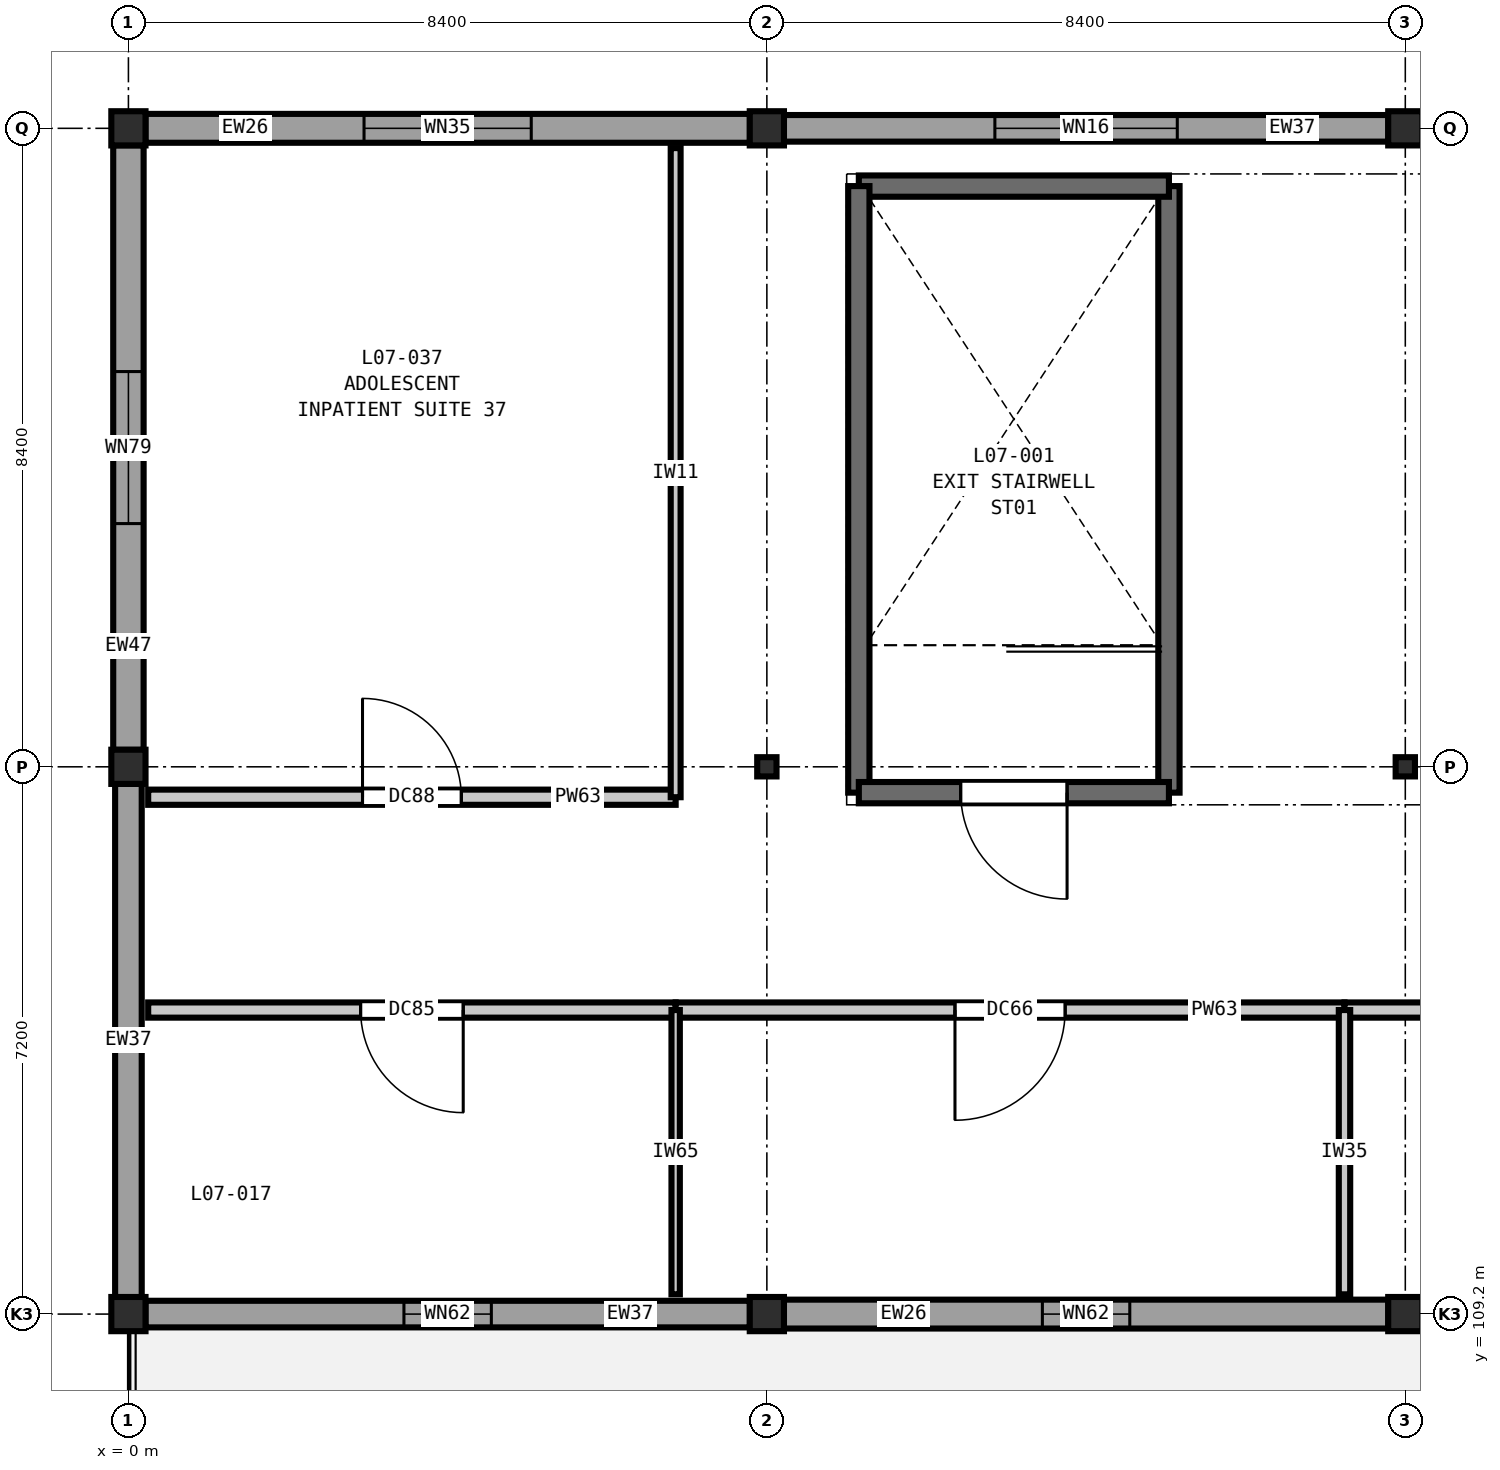
"""IFC4 building model, lengths in metres.
Left out: names, types, materials, properties, quantities, classifications, styles, units other than length and angle.
Written with IfcOpenShell. Run it as: python <this file> out.ifc"""

import sys

from ifc_helpers import new_model, si_unit, direction, frame, frame_2d, origin, origin_2d, place, context, subcontext, project, spatial, rectangle, i_section, extrude, element, fill, save


model = new_model("IFC4")
c1 = context("Model", 3, precision=1e-05, world=origin(), true_north=direction((0.0, 1.0)))
c2 = subcontext(c1, "Body", "Model", "MODEL_VIEW")
j1 = project(units=[si_unit("LENGTHUNIT", "METRE"), si_unit("PLANEANGLEUNIT", "RADIAN")], contexts=[c1])
p1 = place(None, origin())
s1 = spatial("IfcSite", under=j1, at=p1, CompositionType="ELEMENT")
p2 = place(p1, origin())
s2 = spatial("IfcBuilding", under=s1, at=p2, CompositionType="ELEMENT")
p3 = place(p2, frame((0.0, 0.0, 33.0)))
s3 = spatial("IfcBuildingStorey", under=s2, at=p3, CompositionType="ELEMENT", Elevation=33.0)
for number, where, z_axis, x_axis in (
    (1, (0.0, 109.2, 0.0), (0.0, 0.0, 1.0), (1.0, 0.0, 0.0)),
    (2, (0.0, 116.4, 0.0), (0.0, 0.0, 1.0), (1.0, 0.0, 0.0)),
    (3, (0.0, 124.8, 0.0), (0.0, 0.0, 1.0), (1.0, 0.0, 0.0)),
    (4, (8.4, 109.2, 0.0), (0.0, 0.0, 1.0), (1.0, 0.0, 0.0)),
):
    element("IfcColumn", number, at=place(p3, frame(where, z_axis=z_axis, x_axis=x_axis)), inside=s3, PredefinedType="COLUMN", context=c2, shape_type="SweptSolid", body=[
        extrude(rectangle(XDim=0.45, YDim=0.45, at=origin_2d()), origin(), (0.0, 0.0, 1.0), 4.2),
    ])
p4 = place(p3, frame((8.4, 116.4, 0.0), z_axis=(0.0, 0.0, 1.0), x_axis=(1.0, 0.0, 0.0)))
e5 = element("IfcColumn", 5, at=p4, inside=s3, PredefinedType="COLUMN", context=c2, shape_type="SweptSolid", body=[
    extrude(i_section(OverallWidth=0.254, OverallDepth=0.253, WebThickness=0.009, FlangeThickness=0.014, FilletRadius=0.013, at=origin_2d()), origin(), (0.0, 0.0, 1.0), 4.2),
])
for number, where, z_axis, x_axis in (
    (6, (8.4, 124.8, 0.0), (0.0, 0.0, 1.0), (1.0, 0.0, 0.0)),
    (7, (16.8, 109.2, 0.0), (0.0, 0.0, 1.0), (1.0, 0.0, 0.0)),
):
    element("IfcColumn", number, at=place(p3, frame(where, z_axis=z_axis, x_axis=x_axis)), inside=s3, PredefinedType="COLUMN", context=c2, shape_type="SweptSolid", body=[
        extrude(rectangle(XDim=0.45, YDim=0.45, at=origin_2d()), origin(), (0.0, 0.0, 1.0), 4.2),
    ])
p5 = place(p3, frame((16.8, 116.4, 0.0), z_axis=(0.0, 0.0, 1.0), x_axis=(1.0, 0.0, 0.0)))
e8 = element("IfcColumn", 8, at=p5, inside=s3, PredefinedType="COLUMN", context=c2, shape_type="SweptSolid", body=[
    extrude(i_section(OverallWidth=0.254, OverallDepth=0.253, WebThickness=0.009, FlangeThickness=0.014, FilletRadius=0.013, at=origin_2d()), origin(), (0.0, 0.0, 1.0), 4.2),
])
p6 = place(p3, frame((16.8, 124.8, 0.0), z_axis=(0.0, 0.0, 1.0), x_axis=(1.0, 0.0, 0.0)))
e9 = element("IfcColumn", 9, at=p6, inside=s3, PredefinedType="COLUMN", context=c2, shape_type="SweptSolid", body=[
    extrude(rectangle(XDim=0.45, YDim=0.45, at=origin_2d()), origin(), (0.0, 0.0, 1.0), 4.2),
])
p7 = place(p3, frame((0.0, 109.423, 0.0), z_axis=(0.0, 0.0, 1.0), x_axis=(0.0, 1.0, 0.0)))
e10 = element("IfcWall", 10, at=p7, inside=s3, PredefinedType="SOLIDWALL", context=c2, shape_type="SweptSolid", body=[
    extrude(rectangle(XDim=6.754, YDim=0.35, at=frame_2d((3.377, 0.0))), origin(), (0.0, 0.0, 1.0), 3.48),
])
p8 = place(p3, frame((0.0, 116.623, 0.0), z_axis=(0.0, 0.0, 1.0), x_axis=(0.0, 1.0, 0.0)))
e11 = element("IfcWall", 11, at=p8, inside=s3, PredefinedType="SOLIDWALL", context=c2, shape_type="SweptSolid", body=[
    extrude(rectangle(XDim=7.954, YDim=0.4, at=frame_2d((3.977, 0.0))), origin(), (0.0, 0.0, 1.0), 3.48),
])
p9 = place(p8, frame((2.977, 0.0, 0.9)))
e12 = element("IfcOpeningElement", 12, at=p9, cuts=e11, PredefinedType="OPENING", context=c2, shape_type="SweptSolid", body=[
    extrude(rectangle(XDim=2.0, YDim=1.95, at=frame_2d((1.0, 0.975))), frame((0.0, 0.21, 0.0), z_axis=(0.0, -1.0, 0.0), x_axis=(1.0, 0.0, 0.0)), (0.0, 0.0, 1.0), 0.42),
])
p10 = place(p3, frame((0.223, 124.8, 0.0), z_axis=(0.0, 0.0, 1.0), x_axis=(1.0, 0.0, 0.0)))
e13 = element("IfcWall", 13, at=p10, inside=s3, PredefinedType="SOLIDWALL", context=c2, shape_type="SweptSolid", body=[
    extrude(rectangle(XDim=7.954, YDim=0.38, at=frame_2d((3.977, 0.0))), origin(), (0.0, 0.0, 1.0), 3.48),
])
p11 = place(p10, frame((2.877, 0.0, 0.9)))
e14 = element("IfcOpeningElement", 14, at=p11, cuts=e13, PredefinedType="OPENING", context=c2, shape_type="SweptSolid", body=[
    extrude(rectangle(XDim=2.2, YDim=1.95, at=frame_2d((1.1, 0.975))), frame((0.0, 0.2, 0.0), z_axis=(0.0, -1.0, 0.0), x_axis=(1.0, 0.0, 0.0)), (0.0, 0.0, 1.0), 0.4),
])
p12 = place(p3, frame((8.623, 124.8, 0.0), z_axis=(0.0, 0.0, 1.0), x_axis=(1.0, 0.0, 0.0)))
e15 = element("IfcWall", 15, at=p12, inside=s3, PredefinedType="SOLIDWALL", context=c2, shape_type="SweptSolid", body=[
    extrude(rectangle(XDim=7.954, YDim=0.35, at=frame_2d((3.977, 0.0))), origin(), (0.0, 0.0, 1.0), 3.48),
])
p13 = place(p12, frame((2.777, 0.0, 0.9)))
e16 = element("IfcOpeningElement", 16, at=p13, cuts=e15, PredefinedType="OPENING", context=c2, shape_type="SweptSolid", body=[
    extrude(rectangle(XDim=2.4, YDim=1.95, at=frame_2d((1.2, 0.975))), frame((0.0, 0.185, 0.0), z_axis=(0.0, -1.0, 0.0), x_axis=(1.0, 0.0, 0.0)), (0.0, 0.0, 1.0), 0.37),
])
p14 = place(p3, frame((16.577, 109.2, 0.0), z_axis=(0.0, 0.0, 1.0), x_axis=(-1.0, 0.0, 0.0)))
e17 = element("IfcWall", 17, at=p14, inside=s3, PredefinedType="SOLIDWALL", context=c2, shape_type="SweptSolid", body=[
    extrude(rectangle(XDim=7.954, YDim=0.38, at=frame_2d((3.977, 0.0))), origin(), (0.0, 0.0, 1.0), 3.48),
])
p15 = place(p14, frame((3.402, 0.0, 0.9)))
e18 = element("IfcOpeningElement", 18, at=p15, cuts=e17, PredefinedType="OPENING", context=c2, shape_type="SweptSolid", body=[
    extrude(rectangle(XDim=1.15, YDim=1.4, at=frame_2d((0.575, 0.7))), frame((0.0, 0.2, 0.0), z_axis=(0.0, -1.0, 0.0), x_axis=(1.0, 0.0, 0.0)), (0.0, 0.0, 1.0), 0.4),
])
p16 = place(p3, frame((8.177, 109.2, 0.0), z_axis=(0.0, 0.0, 1.0), x_axis=(-1.0, 0.0, 0.0)))
e19 = element("IfcWall", 19, at=p16, inside=s3, PredefinedType="SOLIDWALL", context=c2, shape_type="SweptSolid", body=[
    extrude(rectangle(XDim=7.954, YDim=0.35, at=frame_2d((3.977, 0.0))), origin(), (0.0, 0.0, 1.0), 3.48),
])
p17 = place(p16, frame((3.402, 0.0, 0.9)))
e20 = element("IfcOpeningElement", 20, at=p17, cuts=e19, PredefinedType="OPENING", context=c2, shape_type="SweptSolid", body=[
    extrude(rectangle(XDim=1.15, YDim=1.4, at=frame_2d((0.575, 0.7))), frame((0.0, 0.185, 0.0), z_axis=(0.0, -1.0, 0.0), x_axis=(1.0, 0.0, 0.0)), (0.0, 0.0, 1.0), 0.37),
])
p18 = place(p3, frame((13.69, 116.06, 0.0), z_axis=(0.0, 0.0, 1.0), x_axis=(0.0, 1.0, 0.0)))
e21 = element("IfcWall", 21, at=p18, inside=s3, PredefinedType="SHEAR", context=c2, shape_type="SweptSolid", body=[
    extrude(rectangle(XDim=7.98, YDim=0.28, at=frame_2d((3.99, 0.0))), origin(), (0.0, 0.0, 1.0), 4.2),
])
p19 = place(p3, frame((13.69, 124.04, 0.0), z_axis=(0.0, 0.0, 1.0), x_axis=(-1.0, 0.0, 0.0)))
e22 = element("IfcWall", 22, at=p19, inside=s3, PredefinedType="SHEAR", context=c2, shape_type="SweptSolid", body=[
    extrude(rectangle(XDim=4.08, YDim=0.28, at=frame_2d((2.04, 0.0))), origin(), (0.0, 0.0, 1.0), 4.2),
])
p20 = place(p3, frame((9.61, 124.04, 0.0), z_axis=(0.0, 0.0, 1.0), x_axis=(0.0, -1.0, 0.0)))
e23 = element("IfcWall", 23, at=p20, inside=s3, PredefinedType="SHEAR", context=c2, shape_type="SweptSolid", body=[
    extrude(rectangle(XDim=7.98, YDim=0.28, at=frame_2d((3.99, 0.0))), origin(), (0.0, 0.0, 1.0), 4.2),
])
p21 = place(p3, frame((9.61, 116.06, 0.0), z_axis=(0.0, 0.0, 1.0), x_axis=(1.0, 0.0, 0.0)))
e24 = element("IfcWall", 24, at=p21, inside=s3, PredefinedType="SHEAR", context=c2, shape_type="SweptSolid", body=[
    extrude(rectangle(XDim=4.08, YDim=0.28, at=frame_2d((2.04, 0.0))), origin(), (0.0, 0.0, 1.0), 4.2),
])
p22 = place(p21, frame((1.34, 0.0, 0.0)))
e25 = element("IfcOpeningElement", 25, at=p22, cuts=e24, PredefinedType="OPENING", context=c2, shape_type="SweptSolid", body=[
    extrude(rectangle(XDim=1.4, YDim=2.2, at=frame_2d((0.7, 1.1))), frame((0.0, 0.15, 0.0), z_axis=(0.0, -1.0, 0.0), x_axis=(1.0, 0.0, 0.0)), (0.0, 0.0, 1.0), 0.3),
])
p23 = place(p3, frame((0.26, 113.2, 0.0), z_axis=(0.0, 0.0, 1.0), x_axis=(1.0, 0.0, 0.0)))
e26 = element("IfcWall", 26, at=p23, inside=s3, PredefinedType="PARTITIONING", context=c2, shape_type="SweptSolid", body=[
    extrude(rectangle(XDim=6.94, YDim=0.2, at=frame_2d((3.47, 0.0))), origin(), (0.0, 0.0, 1.0), 3.92),
])
p24 = place(p23, frame((2.795, 0.0, 0.0)))
e27 = element("IfcOpeningElement", 27, at=p24, cuts=e26, PredefinedType="OPENING", context=c2, shape_type="SweptSolid", body=[
    extrude(rectangle(XDim=1.35, YDim=2.2, at=frame_2d((0.675, 1.1))), frame((0.0, 0.11, 0.0), z_axis=(0.0, -1.0, 0.0), x_axis=(1.0, 0.0, 0.0)), (0.0, 0.0, 1.0), 0.22),
])
p25 = place(p3, frame((7.2, 113.2, 0.0), z_axis=(0.0, 0.0, 1.0), x_axis=(1.0, 0.0, 0.0)))
e28 = element("IfcWall", 28, at=p25, inside=s3, PredefinedType="PARTITIONING", context=c2, shape_type="SweptSolid", body=[
    extrude(rectangle(XDim=8.8, YDim=0.2, at=frame_2d((4.4, 0.0))), origin(), (0.0, 0.0, 1.0), 3.92),
])
p26 = place(p25, frame((3.675, 0.0, 0.0)))
e29 = element("IfcOpeningElement", 29, at=p26, cuts=e28, PredefinedType="OPENING", context=c2, shape_type="SweptSolid", body=[
    extrude(rectangle(XDim=1.45, YDim=2.25, at=frame_2d((0.725, 1.125))), frame((0.0, 0.11, 0.0), z_axis=(0.0, -1.0, 0.0), x_axis=(1.0, 0.0, 0.0)), (0.0, 0.0, 1.0), 0.22),
])
p27 = place(p3, frame((16.0, 113.2, 0.0), z_axis=(0.0, 0.0, 1.0), x_axis=(1.0, 0.0, 0.0)))
e30 = element("IfcWall", 30, at=p27, inside=s3, PredefinedType="PARTITIONING", context=c2, shape_type="SweptSolid", body=[
    extrude(rectangle(XDim=5.6, YDim=0.2, at=frame_2d((2.8, 0.0))), origin(), (0.0, 0.0, 1.0), 3.92),
])
p28 = place(p27, frame((2.025, 0.0, 0.0)))
e31 = element("IfcOpeningElement", 31, at=p28, cuts=e30, PredefinedType="OPENING", context=c2, shape_type="SweptSolid", body=[
    extrude(rectangle(XDim=1.55, YDim=2.25, at=frame_2d((0.775, 1.125))), frame((0.0, 0.11, 0.0), z_axis=(0.0, -1.0, 0.0), x_axis=(1.0, 0.0, 0.0)), (0.0, 0.0, 1.0), 0.22),
])
p29 = place(p3, frame((0.26, 116.0, 0.0), z_axis=(0.0, 0.0, 1.0), x_axis=(1.0, 0.0, 0.0)))
e32 = element("IfcWall", 32, at=p29, inside=s3, PredefinedType="PARTITIONING", context=c2, shape_type="SweptSolid", body=[
    extrude(rectangle(XDim=6.94, YDim=0.2, at=frame_2d((3.47, 0.0))), origin(), (0.0, 0.0, 1.0), 3.92),
])
p30 = place(p29, frame((2.82, 0.0, 0.0)))
e33 = element("IfcOpeningElement", 33, at=p30, cuts=e32, PredefinedType="OPENING", context=c2, shape_type="SweptSolid", body=[
    extrude(rectangle(XDim=1.3, YDim=2.2, at=frame_2d((0.65, 1.1))), frame((0.0, 0.11, 0.0), z_axis=(0.0, -1.0, 0.0), x_axis=(1.0, 0.0, 0.0)), (0.0, 0.0, 1.0), 0.22),
])
p31 = place(p3, frame((7.2, 109.46, 0.0), z_axis=(0.0, 0.0, 1.0), x_axis=(0.0, 1.0, 0.0)))
e34 = element("IfcWall", 34, at=p31, inside=s3, PredefinedType="PARTITIONING", context=c2, shape_type="SweptSolid", body=[
    extrude(rectangle(XDim=3.74, YDim=0.11, at=frame_2d((1.87, 0.0))), origin(), (0.0, 0.0, 1.0), 3.92),
])
p32 = place(p3, frame((7.2, 116.0, 0.0), z_axis=(0.0, 0.0, 1.0), x_axis=(0.0, 1.0, 0.0)))
e35 = element("IfcWall", 35, at=p32, inside=s3, PredefinedType="PARTITIONING", context=c2, shape_type="SweptSolid", body=[
    extrude(rectangle(XDim=8.54, YDim=0.13, at=frame_2d((4.27, 0.0))), origin(), (0.0, 0.0, 1.0), 3.92),
])
p33 = place(p3, frame((16.0, 109.46, 0.0), z_axis=(0.0, 0.0, 1.0), x_axis=(0.0, 1.0, 0.0)))
e36 = element("IfcWall", 36, at=p33, inside=s3, PredefinedType="PARTITIONING", context=c2, shape_type="SweptSolid", body=[
    extrude(rectangle(XDim=3.74, YDim=0.15, at=frame_2d((1.87, 0.0))), origin(), (0.0, 0.0, 1.0), 3.92),
])
p34 = place(p9, origin())
e37 = element("IfcWindow", 37, at=p34, inside=s3, PartitioningType="DOUBLE_PANEL_VERTICAL", PredefinedType="WINDOW", context=c2, shape_type="SweptSolid", body=[
    extrude(rectangle(XDim=2.0, YDim=1.95, at=frame_2d((1.0, 0.975))), frame((0.0, 0.03, 0.0), z_axis=(0.0, -1.0, 0.0), x_axis=(1.0, 0.0, 0.0)), (0.0, 0.0, 1.0), 0.06),
])
fill(e12, e37)
p35 = place(p11, origin())
e38 = element("IfcWindow", 38, at=p35, inside=s3, PartitioningType="DOUBLE_PANEL_VERTICAL", PredefinedType="WINDOW", context=c2, shape_type="SweptSolid", body=[
    extrude(rectangle(XDim=2.2, YDim=1.95, at=frame_2d((1.1, 0.975))), frame((0.0, 0.03, 0.0), z_axis=(0.0, -1.0, 0.0), x_axis=(1.0, 0.0, 0.0)), (0.0, 0.0, 1.0), 0.06),
])
fill(e14, e38)
p36 = place(p13, origin())
e39 = element("IfcWindow", 39, at=p36, inside=s3, PartitioningType="DOUBLE_PANEL_VERTICAL", PredefinedType="WINDOW", context=c2, shape_type="SweptSolid", body=[
    extrude(rectangle(XDim=2.4, YDim=1.95, at=frame_2d((1.2, 0.975))), frame((0.0, 0.03, 0.0), z_axis=(0.0, -1.0, 0.0), x_axis=(1.0, 0.0, 0.0)), (0.0, 0.0, 1.0), 0.06),
])
fill(e16, e39)
p37 = place(p15, origin())
e40 = element("IfcWindow", 40, at=p37, inside=s3, PartitioningType="SINGLE_PANEL", PredefinedType="WINDOW", context=c2, shape_type="SweptSolid", body=[
    extrude(rectangle(XDim=1.15, YDim=1.4, at=frame_2d((0.575, 0.7))), frame((0.0, 0.03, 0.0), z_axis=(0.0, -1.0, 0.0), x_axis=(1.0, 0.0, 0.0)), (0.0, 0.0, 1.0), 0.06),
])
fill(e18, e40)
p38 = place(p17, origin())
e41 = element("IfcWindow", 41, at=p38, inside=s3, PartitioningType="SINGLE_PANEL", PredefinedType="WINDOW", context=c2, shape_type="SweptSolid", body=[
    extrude(rectangle(XDim=1.15, YDim=1.4, at=frame_2d((0.575, 0.7))), frame((0.0, 0.03, 0.0), z_axis=(0.0, -1.0, 0.0), x_axis=(1.0, 0.0, 0.0)), (0.0, 0.0, 1.0), 0.06),
])
fill(e20, e41)
p39 = place(p22, frame((1.4, 0.0, 0.0), z_axis=(0.0, 0.0, 1.0), x_axis=(-1.0, 0.0, 0.0)))
e42 = element("IfcDoor", 42, at=p39, inside=s3, OperationType="SINGLE_SWING_LEFT", PredefinedType="DOOR", context=c2, shape_type="SweptSolid", body=[
    extrude(rectangle(XDim=1.4, YDim=2.2, at=frame_2d((0.7, 1.1))), frame((0.0, 0.025, 0.0), z_axis=(0.0, -1.0, 0.0), x_axis=(1.0, 0.0, 0.0)), (0.0, 0.0, 1.0), 0.05),
])
fill(e25, e42)
p40 = place(p24, frame((1.35, 0.0, 0.0), z_axis=(0.0, 0.0, 1.0), x_axis=(-1.0, 0.0, 0.0)))
e43 = element("IfcDoor", 43, at=p40, inside=s3, OperationType="SINGLE_SWING_LEFT", PredefinedType="DOOR", context=c2, shape_type="SweptSolid", body=[
    extrude(rectangle(XDim=1.35, YDim=2.2, at=frame_2d((0.675, 1.1))), frame((0.0, 0.025, 0.0), z_axis=(0.0, -1.0, 0.0), x_axis=(1.0, 0.0, 0.0)), (0.0, 0.0, 1.0), 0.05),
])
fill(e27, e43)
p41 = place(p26, frame((1.45, 0.0, 0.0), z_axis=(0.0, 0.0, 1.0), x_axis=(-1.0, 0.0, 0.0)))
e44 = element("IfcDoor", 44, at=p41, inside=s3, OperationType="SINGLE_SWING_RIGHT", PredefinedType="DOOR", context=c2, shape_type="SweptSolid", body=[
    extrude(rectangle(XDim=1.45, YDim=2.25, at=frame_2d((0.725, 1.125))), frame((0.0, 0.025, 0.0), z_axis=(0.0, -1.0, 0.0), x_axis=(1.0, 0.0, 0.0)), (0.0, 0.0, 1.0), 0.05),
])
fill(e29, e44)
p42 = place(p30, origin())
e45 = element("IfcDoor", 45, at=p42, inside=s3, OperationType="SINGLE_SWING_LEFT", PredefinedType="DOOR", context=c2, shape_type="SweptSolid", body=[
    extrude(rectangle(XDim=1.3, YDim=2.2, at=frame_2d((0.65, 1.1))), frame((0.0, 0.025, 0.0), z_axis=(0.0, -1.0, 0.0), x_axis=(1.0, 0.0, 0.0)), (0.0, 0.0, 1.0), 0.05),
])
fill(e33, e45)
save(model, sys.argv[1])
